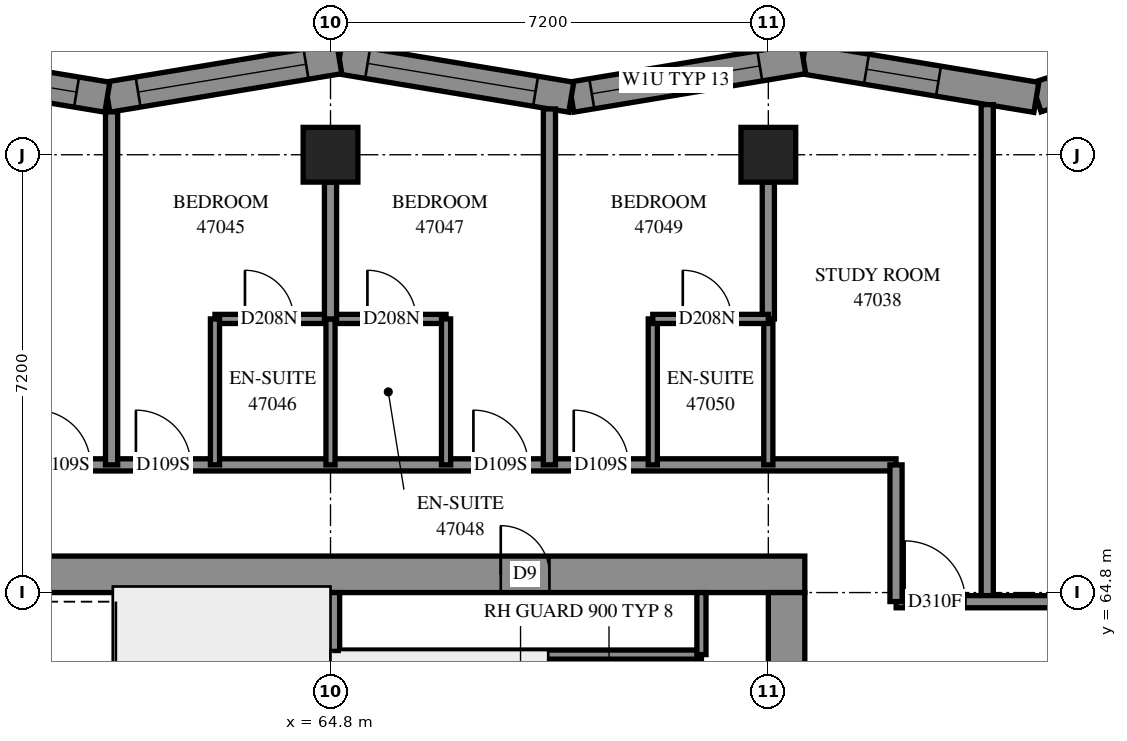
"""IFC4 building model, lengths in metres.
Left out: names, types, materials, properties, quantities, classifications, styles, units other than length and angle.
Written with IfcOpenShell. Run it as: python <this file> out.ifc"""

import sys

from ifc_helpers import new_model, si_unit, direction, frame, frame_2d, origin, origin_2d, place, context, subcontext, project, spatial, polyline, rectangle, outline, extrude, element, fill, save


model = new_model("IFC4")
c1 = context("Model", 3, precision=1e-05, world=origin(), true_north=direction((0.0, 1.0)))
c2 = subcontext(c1, "Body", "Model", "MODEL_VIEW")
j1 = project(units=[si_unit("LENGTHUNIT", "METRE"), si_unit("PLANEANGLEUNIT", "RADIAN")], contexts=[c1])
p1 = place(None, origin())
s1 = spatial("IfcSite", under=j1, at=p1, CompositionType="ELEMENT")
p2 = place(p1, origin())
s2 = spatial("IfcBuilding", under=s1, at=p2, CompositionType="ELEMENT")
p3 = place(p2, frame((0.0, 0.0, 172.8)))
s3 = spatial("IfcBuildingStorey", under=s2, at=p3, CompositionType="ELEMENT", Elevation=172.8)
for number, where, z_axis, x_axis in (
    (1, (64.8, 72.0, 0.0), (0.0, 0.0, 1.0), (1.0, 0.0, 0.0)),
    (2, (72.0, 72.0, 0.0), (0.0, 0.0, 1.0), (1.0, 0.0, 0.0)),
):
    element("IfcColumn", number, at=place(p3, frame(where, z_axis=z_axis, x_axis=x_axis)), inside=s3, PredefinedType="COLUMN", context=c2, shape_type="SweptSolid", body=[
        extrude(rectangle(XDim=0.9, YDim=0.9, at=origin_2d()), origin(), (0.0, 0.0, 1.0), 3.1),
    ])
p4 = place(p3, frame((57.0, 65.1, -0.3), z_axis=(0.0, 0.0, 1.0), x_axis=(1.0, 0.0, 0.0)))
e3 = element("IfcWall", 3, at=p4, inside=s3, PredefinedType="SHEAR", context=c2, shape_type="SweptSolid", body=[
    extrude(rectangle(XDim=15.6, YDim=0.6, at=frame_2d((7.8, 0.0))), origin(), (0.0, 0.0, 1.0), 2.7),
])
p5 = place(p4, frame((10.6, 0.0, 0.3)))
e4 = element("IfcOpeningElement", 4, at=p5, cuts=e3, PredefinedType="OPENING", context=c2, shape_type="SweptSolid", body=[
    extrude(rectangle(XDim=0.8, YDim=2.1, at=frame_2d((0.4, 1.05))), frame((0.0, 0.31, 0.0), z_axis=(0.0, -1.0, 0.0), x_axis=(1.0, 0.0, 0.0)), (0.0, 0.0, 1.0), 0.62),
])
p6 = place(p3, frame((72.3, 50.4, -0.3), z_axis=(0.0, 0.0, 1.0), x_axis=(0.0, 1.0, 0.0)))
e5 = element("IfcWall", 5, at=p6, inside=s3, PredefinedType="SHEAR", context=c2, shape_type="SweptSolid", body=[
    extrude(rectangle(XDim=14.4, YDim=0.6, at=frame_2d((7.2, 0.0))), origin(), (0.0, 0.0, 1.0), 2.7),
])
p7 = place(p6, frame((4.55, 0.0, 0.3)))
e6 = element("IfcOpeningElement", 6, at=p7, cuts=e5, PredefinedType="OPENING", context=c2, shape_type="SweptSolid", body=[
    extrude(rectangle(XDim=1.1, YDim=2.1, at=frame_2d((0.55, 1.05))), frame((0.0, 0.31, 0.0), z_axis=(0.0, -1.0, 0.0), x_axis=(1.0, 0.0, 0.0)), (0.0, 0.0, 1.0), 0.62),
])
p8 = place(p6, frame((11.35, 0.0, 0.3)))
e7 = element("IfcOpeningElement", 7, at=p8, cuts=e5, PredefinedType="OPENING", context=c2, shape_type="SweptSolid", body=[
    extrude(rectangle(XDim=1.1, YDim=2.1, at=frame_2d((0.55, 1.05))), frame((0.0, 0.31, 0.0), z_axis=(0.0, -1.0, 0.0), x_axis=(1.0, 0.0, 0.0)), (0.0, 0.0, 1.0), 0.62),
])
p9 = place(p3, frame((64.8, 60.6, 0.0), z_axis=(0.0, 0.0, 1.0), x_axis=(0.0, 1.0, 0.0)))
e8 = element("IfcWall", 8, at=p9, inside=s3, PredefinedType="SOLIDWALL", context=c2, shape_type="SweptSolid", body=[
    extrude(rectangle(XDim=4.2, YDim=0.3, at=frame_2d((2.1, 0.0))), origin(), (0.0, 0.0, 1.0), 3.1),
])
p10 = place(p3, frame((80.07, 74.127, 0.0), z_axis=(0.0, 0.0, 1.0), x_axis=(-0.9515326518, -0.3075477402, 0.0)))
e9 = element("IfcWall", 9, at=p10, inside=s3, PredefinedType="SOLIDWALL", context=c2, shape_type="SweptSolid", body=[
    extrude(outline(polyline([(-0.221, -0.25), (3.788, -0.25), (3.91, 0.25), (0.221, 0.25), (-0.221, -0.25)])), origin(), (0.0, 0.0, 1.0), 3.1),
])
p11 = place(p10, frame((1.682, 0.0, 0.45)))
e10 = element("IfcOpeningElement", 10, at=p11, cuts=e9, PredefinedType="OPENING", context=c2, shape_type="SweptSolid", body=[
    extrude(rectangle(XDim=1.2, YDim=2.5, at=frame_2d((0.6, 1.25))), frame((0.0, 0.26, 0.0), z_axis=(0.0, -1.0, 0.0), x_axis=(1.0, 0.0, 0.0)), (0.0, 0.0, 1.0), 0.52),
])
p12 = place(p3, frame((76.408, 72.943, 0.0), z_axis=(0.0, 0.0, 1.0), x_axis=(-0.9865091264, 0.1637062722, 0.0)))
e11 = element("IfcWall", 11, at=p12, inside=s3, PredefinedType="SOLIDWALL", context=c2, shape_type="SweptSolid", body=[
    extrude(outline(polyline([(0.061, -0.25), (3.928, -0.25), (3.845, 0.25), (-0.061, 0.25), (0.061, -0.25)])), origin(), (0.0, 0.0, 1.0), 3.1),
])
p13 = place(p12, frame((1.632, 0.0, 0.45)))
e12 = element("IfcOpeningElement", 12, at=p13, cuts=e11, PredefinedType="OPENING", context=c2, shape_type="SweptSolid", body=[
    extrude(rectangle(XDim=1.2, YDim=2.5, at=frame_2d((0.6, 1.25))), frame((0.0, 0.26, 0.0), z_axis=(0.0, -1.0, 0.0), x_axis=(1.0, 0.0, 0.0)), (0.0, 0.0, 1.0), 0.52),
])
p14 = place(p3, frame((72.574, 73.58, 0.0), z_axis=(0.0, 0.0, 1.0), x_axis=(-0.9865110911, -0.1636944324, 0.0)))
e13 = element("IfcWall", 13, at=p14, inside=s3, PredefinedType="SOLIDWALL", context=c2, shape_type="SweptSolid", body=[
    extrude(outline(polyline([(-0.042, -0.25), (3.825, -0.25), (3.908, 0.25), (0.042, 0.25), (-0.042, -0.25)])), origin(), (0.0, 0.0, 1.0), 3.1),
])
p15 = place(p14, frame((0.724, 0.0, 0.45)))
e14 = element("IfcOpeningElement", 14, at=p15, cuts=e13, PredefinedType="OPENING", context=c2, shape_type="SweptSolid", body=[
    extrude(rectangle(XDim=2.8, YDim=2.5, at=frame_2d((1.4, 1.25))), frame((0.0, 0.26, 0.0), z_axis=(0.0, -1.0, 0.0), x_axis=(1.0, 0.0, 0.0)), (0.0, 0.0, 1.0), 0.52),
])
p16 = place(p3, frame((68.759, 72.947, 0.0), z_axis=(0.0, 0.0, 1.0), x_axis=(-0.9865110911, 0.1636944324, 0.0)))
e15 = element("IfcWall", 15, at=p16, inside=s3, PredefinedType="SOLIDWALL", context=c2, shape_type="SweptSolid", body=[
    extrude(outline(polyline([(0.042, -0.25), (3.908, -0.25), (3.825, 0.25), (-0.042, 0.25), (0.042, -0.25)])), origin(), (0.0, 0.0, 1.0), 3.1),
])
p17 = place(p16, frame((0.595, 0.0, 0.45)))
e16 = element("IfcOpeningElement", 16, at=p17, cuts=e15, PredefinedType="OPENING", context=c2, shape_type="SweptSolid", body=[
    extrude(rectangle(XDim=2.8, YDim=2.5, at=frame_2d((1.4, 1.25))), frame((0.0, 0.26, 0.0), z_axis=(0.0, -1.0, 0.0), x_axis=(1.0, 0.0, 0.0)), (0.0, 0.0, 1.0), 0.52),
])
p18 = place(p3, frame((64.944, 73.58, 0.0), z_axis=(0.0, 0.0, 1.0), x_axis=(-0.9865103981, -0.1636986085, 0.0)))
e17 = element("IfcWall", 17, at=p18, inside=s3, PredefinedType="SOLIDWALL", context=c2, shape_type="SweptSolid", body=[
    extrude(outline(polyline([(-0.042, -0.25), (3.825, -0.25), (3.908, 0.25), (0.042, 0.25), (-0.042, -0.25)])), origin(), (0.0, 0.0, 1.0), 3.1),
])
p19 = place(p18, frame((0.554, 0.0, 0.45)))
e18 = element("IfcOpeningElement", 18, at=p19, cuts=e17, PredefinedType="OPENING", context=c2, shape_type="SweptSolid", body=[
    extrude(rectangle(XDim=2.8, YDim=2.5, at=frame_2d((1.4, 1.25))), frame((0.0, 0.26, 0.0), z_axis=(0.0, -1.0, 0.0), x_axis=(1.0, 0.0, 0.0)), (0.0, 0.0, 1.0), 0.52),
])
p20 = place(p3, frame((61.13, 72.947, 0.0), z_axis=(0.0, 0.0, 1.0), x_axis=(-0.9865110911, 0.1636944324, 0.0)))
e19 = element("IfcWall", 19, at=p20, inside=s3, PredefinedType="SOLIDWALL", context=c2, shape_type="SweptSolid", body=[
    extrude(outline(polyline([(0.042, -0.25), (3.908, -0.25), (3.825, 0.25), (-0.042, 0.25), (0.042, -0.25)])), origin(), (0.0, 0.0, 1.0), 3.1),
])
p21 = place(p20, frame((0.513, 0.0, 0.45)))
e20 = element("IfcOpeningElement", 20, at=p21, cuts=e19, PredefinedType="OPENING", context=c2, shape_type="SweptSolid", body=[
    extrude(rectangle(XDim=2.8, YDim=2.5, at=frame_2d((1.4, 1.25))), frame((0.0, 0.26, 0.0), z_axis=(0.0, -1.0, 0.0), x_axis=(1.0, 0.0, 0.0)), (0.0, 0.0, 1.0), 0.52),
])
p22 = place(p3, frame((64.95, 63.78, 0.0), z_axis=(0.0, 0.0, 1.0), x_axis=(1.0, 0.0, 0.0)))
e21 = element("IfcWall", 21, at=p22, inside=s3, PredefinedType="PARTITIONING", context=c2, shape_type="SweptSolid", body=[
    extrude(rectangle(XDim=5.95, YDim=0.15, at=frame_2d((2.975, 0.0))), origin(), (0.0, 0.0, 1.0), 3.1),
])
p23 = place(p3, frame((70.9, 63.78, 0.0), z_axis=(0.0, 0.0, 1.0), x_axis=(0.0, 1.0, 0.0)))
e22 = element("IfcWall", 22, at=p23, inside=s3, PredefinedType="PARTITIONING", context=c2, shape_type="SweptSolid", body=[
    extrude(rectangle(XDim=1.02, YDim=0.15, at=frame_2d((0.51, 0.0))), origin(), (0.0, 0.0, 1.0), 3.1),
])
p24 = place(p3, frame((55.5, 66.9, 0.0), z_axis=(0.0, 0.0, 1.0), x_axis=(1.0, 0.0, 0.0)))
e23 = element("IfcWall", 23, at=p24, inside=s3, PredefinedType="PARTITIONING", context=c2, shape_type="SweptSolid", body=[
    extrude(rectangle(XDim=18.6, YDim=0.2, at=frame_2d((9.3, 0.0))), origin(), (0.0, 0.0, 1.0), 3.1),
])
p25 = place(p24, frame((4.45, 0.0, 0.0)))
e24 = element("IfcOpeningElement", 24, at=p25, cuts=e23, PredefinedType="OPENING", context=c2, shape_type="SweptSolid", body=[
    extrude(rectangle(XDim=0.9, YDim=2.1, at=frame_2d((0.45, 1.05))), frame((0.0, 0.11, 0.0), z_axis=(0.0, -1.0, 0.0), x_axis=(1.0, 0.0, 0.0)), (0.0, 0.0, 1.0), 0.22),
])
p26 = place(p24, frame((6.1, 0.0, 0.0)))
e25 = element("IfcOpeningElement", 25, at=p26, cuts=e23, PredefinedType="OPENING", context=c2, shape_type="SweptSolid", body=[
    extrude(rectangle(XDim=0.9, YDim=2.1, at=frame_2d((0.45, 1.05))), frame((0.0, 0.11, 0.0), z_axis=(0.0, -1.0, 0.0), x_axis=(1.0, 0.0, 0.0)), (0.0, 0.0, 1.0), 0.22),
])
p27 = place(p24, frame((11.65, 0.0, 0.0)))
e26 = element("IfcOpeningElement", 26, at=p27, cuts=e23, PredefinedType="OPENING", context=c2, shape_type="SweptSolid", body=[
    extrude(rectangle(XDim=0.9, YDim=2.1, at=frame_2d((0.45, 1.05))), frame((0.0, 0.11, 0.0), z_axis=(0.0, -1.0, 0.0), x_axis=(1.0, 0.0, 0.0)), (0.0, 0.0, 1.0), 0.22),
])
p28 = place(p24, frame((13.3, 0.0, 0.0)))
e27 = element("IfcOpeningElement", 27, at=p28, cuts=e23, PredefinedType="OPENING", context=c2, shape_type="SweptSolid", body=[
    extrude(rectangle(XDim=0.9, YDim=2.1, at=frame_2d((0.45, 1.05))), frame((0.0, 0.11, 0.0), z_axis=(0.0, -1.0, 0.0), x_axis=(1.0, 0.0, 0.0)), (0.0, 0.0, 1.0), 0.22),
])
p29 = place(p3, frame((75.6, 64.65, 0.0), z_axis=(0.0, 0.0, 1.0), x_axis=(0.0, 1.0, 0.0)))
e28 = element("IfcWall", 28, at=p29, inside=s3, PredefinedType="PARTITIONING", context=c2, shape_type="SweptSolid", body=[
    extrude(rectangle(XDim=8.174, YDim=0.2, at=frame_2d((4.087, 0.0))), origin(), (0.0, 0.0, 1.0), 3.1),
])
p30 = place(p3, frame((68.4, 66.9, 0.0), z_axis=(0.0, 0.0, 1.0), x_axis=(0.0, 1.0, 0.0)))
e29 = element("IfcWall", 29, at=p30, inside=s3, PredefinedType="PARTITIONING", context=c2, shape_type="SweptSolid", body=[
    extrude(rectangle(XDim=5.853, YDim=0.2, at=frame_2d((2.926, 0.0))), origin(), (0.0, 0.0, 1.0), 3.1),
])
p31 = place(p3, frame((61.2, 66.9, 0.0), z_axis=(0.0, 0.0, 1.0), x_axis=(0.0, 1.0, 0.0)))
e30 = element("IfcWall", 30, at=p31, inside=s3, PredefinedType="PARTITIONING", context=c2, shape_type="SweptSolid", body=[
    extrude(rectangle(XDim=5.805, YDim=0.2, at=frame_2d((2.902, 0.0))), origin(), (0.0, 0.0, 1.0), 3.1),
])
p32 = place(p3, frame((74.102, 64.65, 0.0), z_axis=(0.0, 0.0, 1.0), x_axis=(1.0, 0.0, 0.0)))
e31 = element("IfcWall", 31, at=p32, inside=s3, PredefinedType="PARTITIONING", context=c2, shape_type="SweptSolid", body=[
    extrude(rectangle(XDim=4.648, YDim=0.2, at=frame_2d((2.324, 0.0))), origin(), (0.0, 0.0, 1.0), 3.1),
])
p33 = place(p32, frame((0.14, 0.0, 0.0)))
e32 = element("IfcOpeningElement", 32, at=p33, cuts=e31, PredefinedType="OPENING", context=c2, shape_type="SweptSolid", body=[
    extrude(rectangle(XDim=1.0, YDim=2.1, at=frame_2d((0.5, 1.05))), frame((0.0, 0.11, 0.0), z_axis=(0.0, -1.0, 0.0), x_axis=(1.0, 0.0, 0.0)), (0.0, 0.0, 1.0), 0.22),
])
p34 = place(p3, frame((62.9, 69.3, 0.0), z_axis=(0.0, 0.0, 1.0), x_axis=(1.0, 0.0, 0.0)))
e33 = element("IfcWall", 33, at=p34, inside=s3, PredefinedType="PARTITIONING", context=c2, shape_type="SweptSolid", body=[
    extrude(rectangle(XDim=3.8, YDim=0.15, at=frame_2d((1.9, 0.0))), origin(), (0.0, 0.0, 1.0), 3.1),
])
p35 = place(p34, frame((0.493, 0.0, 0.0)))
e34 = element("IfcOpeningElement", 34, at=p35, cuts=e33, PredefinedType="OPENING", context=c2, shape_type="SweptSolid", body=[
    extrude(rectangle(XDim=0.8, YDim=2.1, at=frame_2d((0.4, 1.05))), frame((0.0, 0.085, 0.0), z_axis=(0.0, -1.0, 0.0), x_axis=(1.0, 0.0, 0.0)), (0.0, 0.0, 1.0), 0.17),
])
p36 = place(p34, frame((2.507, 0.0, 0.0)))
e35 = element("IfcOpeningElement", 35, at=p36, cuts=e33, PredefinedType="OPENING", context=c2, shape_type="SweptSolid", body=[
    extrude(rectangle(XDim=0.8, YDim=2.1, at=frame_2d((0.4, 1.05))), frame((0.0, 0.085, 0.0), z_axis=(0.0, -1.0, 0.0), x_axis=(1.0, 0.0, 0.0)), (0.0, 0.0, 1.0), 0.17),
])
for number, where, z_axis, x_axis in (
    (36, (62.9, 66.9, 0.0), (0.0, 0.0, 1.0), (0.0, 1.0, 0.0)),
    (37, (64.8, 66.9, 0.0), (0.0, 0.0, 1.0), (0.0, 1.0, 0.0)),
    (38, (66.7, 66.9, 0.0), (0.0, 0.0, 1.0), (0.0, 1.0, 0.0)),
    (39, (70.1, 66.9, 0.0), (0.0, 0.0, 1.0), (0.0, 1.0, 0.0)),
    (40, (72.0, 66.9, 0.0), (0.0, 0.0, 1.0), (0.0, 1.0, 0.0)),
):
    element("IfcWall", number, at=place(p3, frame(where, z_axis=z_axis, x_axis=x_axis)), inside=s3, PredefinedType="PARTITIONING", context=c2, shape_type="SweptSolid", body=[
        extrude(rectangle(XDim=2.4, YDim=0.15, at=frame_2d((1.2, 0.0))), origin(), (0.0, 0.0, 1.0), 3.1),
    ])
for number, where, z_axis, x_axis in (
    (41, (64.8, 69.3, 0.0), (0.0, 0.0, 1.0), (0.0, 1.0, 0.0)),
    (42, (72.0, 69.3, 0.0), (0.0, 0.0, 1.0), (0.0, 1.0, 0.0)),
):
    element("IfcWall", number, at=place(p3, frame(where, z_axis=z_axis, x_axis=x_axis)), inside=s3, PredefinedType="PARTITIONING", context=c2, shape_type="SweptSolid", body=[
        extrude(rectangle(XDim=2.25, YDim=0.2, at=frame_2d((1.125, 0.0))), origin(), (0.0, 0.0, 1.0), 3.1),
    ])
p37 = place(p3, frame((74.1, 64.652, 0.0), z_axis=(0.0, 0.0, 1.0), x_axis=(0.0, 1.0, 0.0)))
e43 = element("IfcWall", 43, at=p37, inside=s3, PredefinedType="PARTITIONING", context=c2, shape_type="SweptSolid", body=[
    extrude(rectangle(XDim=2.248, YDim=0.2, at=frame_2d((1.124, 0.0))), origin(), (0.0, 0.0, 1.0), 3.1),
])
p38 = place(p3, frame((70.1, 69.3, 0.0), z_axis=(0.0, 0.0, 1.0), x_axis=(1.0, 0.0, 0.0)))
e44 = element("IfcWall", 44, at=p38, inside=s3, PredefinedType="PARTITIONING", context=c2, shape_type="SweptSolid", body=[
    extrude(rectangle(XDim=1.9, YDim=0.15, at=frame_2d((0.95, 0.0))), origin(), (0.0, 0.0, 1.0), 3.1),
])
p39 = place(p38, frame((0.493, 0.0, 0.0)))
e45 = element("IfcOpeningElement", 45, at=p39, cuts=e44, PredefinedType="OPENING", context=c2, shape_type="SweptSolid", body=[
    extrude(rectangle(XDim=0.8, YDim=2.1, at=frame_2d((0.4, 1.05))), frame((0.0, 0.085, 0.0), z_axis=(0.0, -1.0, 0.0), x_axis=(1.0, 0.0, 0.0)), (0.0, 0.0, 1.0), 0.17),
])
p40 = place(p13, origin())
e46 = element("IfcWindow", 46, at=p40, inside=s3, PartitioningType="SINGLE_PANEL", PredefinedType="WINDOW", context=c2, shape_type="SweptSolid", body=[
    extrude(rectangle(XDim=1.2, YDim=2.5, at=frame_2d((0.6, 1.25))), frame((0.0, 0.18, 0.0), z_axis=(0.0, -1.0, 0.0), x_axis=(1.0, 0.0, 0.0)), (0.0, 0.0, 1.0), 0.06),
])
fill(e12, e46)
p41 = place(p15, origin())
e47 = element("IfcWindow", 47, at=p41, inside=s3, PartitioningType="SINGLE_PANEL", PredefinedType="WINDOW", context=c2, shape_type="SweptSolid", body=[
    extrude(rectangle(XDim=2.8, YDim=2.5, at=frame_2d((1.4, 1.25))), frame((0.0, 0.18, 0.0), z_axis=(0.0, -1.0, 0.0), x_axis=(1.0, 0.0, 0.0)), (0.0, 0.0, 1.0), 0.06),
])
fill(e14, e47)
p42 = place(p17, origin())
e48 = element("IfcWindow", 48, at=p42, inside=s3, PartitioningType="SINGLE_PANEL", PredefinedType="WINDOW", context=c2, shape_type="SweptSolid", body=[
    extrude(rectangle(XDim=2.8, YDim=2.5, at=frame_2d((1.4, 1.25))), frame((0.0, 0.18, 0.0), z_axis=(0.0, -1.0, 0.0), x_axis=(1.0, 0.0, 0.0)), (0.0, 0.0, 1.0), 0.06),
])
fill(e16, e48)
p43 = place(p19, origin())
e49 = element("IfcWindow", 49, at=p43, inside=s3, PartitioningType="SINGLE_PANEL", PredefinedType="WINDOW", context=c2, shape_type="SweptSolid", body=[
    extrude(rectangle(XDim=2.8, YDim=2.5, at=frame_2d((1.4, 1.25))), frame((0.0, 0.18, 0.0), z_axis=(0.0, -1.0, 0.0), x_axis=(1.0, 0.0, 0.0)), (0.0, 0.0, 1.0), 0.06),
])
fill(e18, e49)
p44 = place(p21, origin())
e50 = element("IfcWindow", 50, at=p44, inside=s3, PartitioningType="SINGLE_PANEL", PredefinedType="WINDOW", context=c2, shape_type="SweptSolid", body=[
    extrude(rectangle(XDim=2.8, YDim=2.5, at=frame_2d((1.4, 1.25))), frame((0.0, 0.18, 0.0), z_axis=(0.0, -1.0, 0.0), x_axis=(1.0, 0.0, 0.0)), (0.0, 0.0, 1.0), 0.06),
])
fill(e20, e50)
p45 = place(p5, origin())
e51 = element("IfcDoor", 51, at=p45, inside=s3, OperationType="SINGLE_SWING_RIGHT", PredefinedType="DOOR", context=c2, shape_type="SweptSolid", body=[
    extrude(rectangle(XDim=0.8, YDim=2.1, at=frame_2d((0.4, 1.05))), frame((0.0, 0.025, 0.0), z_axis=(0.0, -1.0, 0.0), x_axis=(1.0, 0.0, 0.0)), (0.0, 0.0, 1.0), 0.05),
])
fill(e4, e51)
p46 = place(p33, origin())
e52 = element("IfcDoor", 52, at=p46, inside=s3, OperationType="SINGLE_SWING_RIGHT", PredefinedType="DOOR", context=c2, shape_type="SweptSolid", body=[
    extrude(rectangle(XDim=1.0, YDim=2.1, at=frame_2d((0.5, 1.05))), frame((0.0, 0.025, 0.0), z_axis=(0.0, -1.0, 0.0), x_axis=(1.0, 0.0, 0.0)), (0.0, 0.0, 1.0), 0.05),
])
fill(e32, e52)
p47 = place(p25, origin())
e53 = element("IfcDoor", 53, at=p47, inside=s3, OperationType="SINGLE_SWING_RIGHT", PredefinedType="DOOR", context=c2, shape_type="SweptSolid", body=[
    extrude(rectangle(XDim=0.9, YDim=2.1, at=frame_2d((0.45, 1.05))), frame((0.0, 0.025, 0.0), z_axis=(0.0, -1.0, 0.0), x_axis=(1.0, 0.0, 0.0)), (0.0, 0.0, 1.0), 0.05),
])
fill(e24, e53)
p48 = place(p26, origin())
e54 = element("IfcDoor", 54, at=p48, inside=s3, OperationType="SINGLE_SWING_LEFT", PredefinedType="DOOR", context=c2, shape_type="SweptSolid", body=[
    extrude(rectangle(XDim=0.9, YDim=2.1, at=frame_2d((0.45, 1.05))), frame((0.0, 0.025, 0.0), z_axis=(0.0, -1.0, 0.0), x_axis=(1.0, 0.0, 0.0)), (0.0, 0.0, 1.0), 0.05),
])
fill(e25, e54)
p49 = place(p35, origin())
e55 = element("IfcDoor", 55, at=p49, inside=s3, OperationType="SINGLE_SWING_RIGHT", PredefinedType="DOOR", context=c2, shape_type="SweptSolid", body=[
    extrude(rectangle(XDim=0.8, YDim=2.1, at=frame_2d((0.4, 1.05))), frame((0.0, 0.025, 0.0), z_axis=(0.0, -1.0, 0.0), x_axis=(1.0, 0.0, 0.0)), (0.0, 0.0, 1.0), 0.05),
])
fill(e34, e55)
p50 = place(p27, origin())
e56 = element("IfcDoor", 56, at=p50, inside=s3, OperationType="SINGLE_SWING_RIGHT", PredefinedType="DOOR", context=c2, shape_type="SweptSolid", body=[
    extrude(rectangle(XDim=0.9, YDim=2.1, at=frame_2d((0.45, 1.05))), frame((0.0, 0.025, 0.0), z_axis=(0.0, -1.0, 0.0), x_axis=(1.0, 0.0, 0.0)), (0.0, 0.0, 1.0), 0.05),
])
fill(e26, e56)
p51 = place(p36, origin())
e57 = element("IfcDoor", 57, at=p51, inside=s3, OperationType="SINGLE_SWING_RIGHT", PredefinedType="DOOR", context=c2, shape_type="SweptSolid", body=[
    extrude(rectangle(XDim=0.8, YDim=2.1, at=frame_2d((0.4, 1.05))), frame((0.0, 0.025, 0.0), z_axis=(0.0, -1.0, 0.0), x_axis=(1.0, 0.0, 0.0)), (0.0, 0.0, 1.0), 0.05),
])
fill(e35, e57)
p52 = place(p28, origin())
e58 = element("IfcDoor", 58, at=p52, inside=s3, OperationType="SINGLE_SWING_LEFT", PredefinedType="DOOR", context=c2, shape_type="SweptSolid", body=[
    extrude(rectangle(XDim=0.9, YDim=2.1, at=frame_2d((0.45, 1.05))), frame((0.0, 0.025, 0.0), z_axis=(0.0, -1.0, 0.0), x_axis=(1.0, 0.0, 0.0)), (0.0, 0.0, 1.0), 0.05),
])
fill(e27, e58)
p53 = place(p39, origin())
e59 = element("IfcDoor", 59, at=p53, inside=s3, OperationType="SINGLE_SWING_RIGHT", PredefinedType="DOOR", context=c2, shape_type="SweptSolid", body=[
    extrude(rectangle(XDim=0.8, YDim=2.1, at=frame_2d((0.4, 1.05))), frame((0.0, 0.025, 0.0), z_axis=(0.0, -1.0, 0.0), x_axis=(1.0, 0.0, 0.0)), (0.0, 0.0, 1.0), 0.05),
])
fill(e45, e59)
save(model, sys.argv[1])
